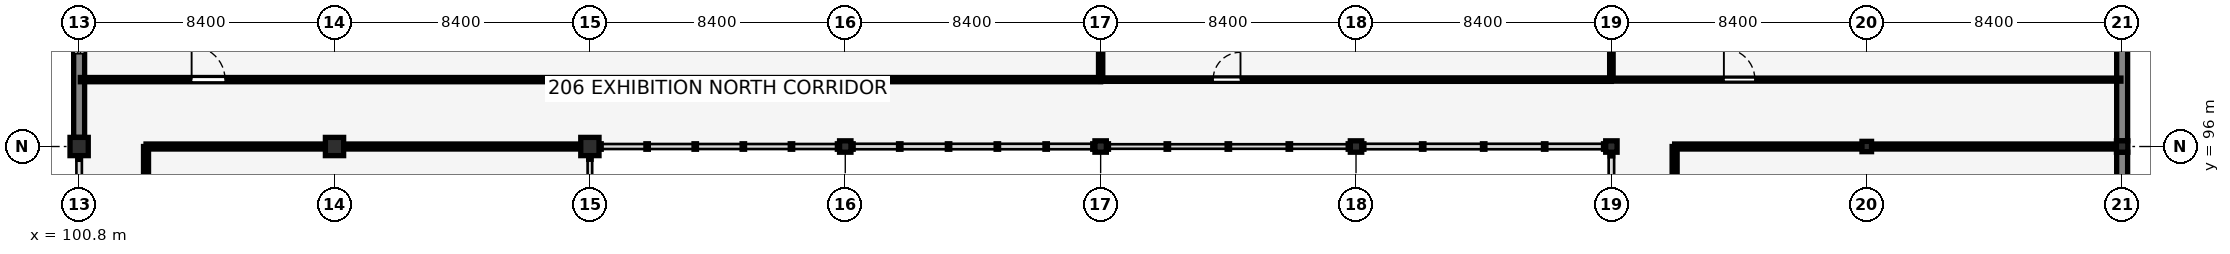
"""IFC4 building model, lengths in metres.
Left out: names, types, materials, properties, quantities, classifications, styles, units other than length and angle.
Written with IfcOpenShell. Run it as: python <this file> out.ifc"""

import sys

from ifc_helpers import new_model, si_unit, direction, frame, frame_2d, origin, origin_2d, place, context, subcontext, project, spatial, rectangle, i_section, extrude, element, fill, save


model = new_model("IFC4")
c1 = context("Model", 3, precision=1e-05, world=origin(), true_north=direction((0.0, 1.0)))
c2 = subcontext(c1, "Body", "Model", "MODEL_VIEW")
j1 = project(units=[si_unit("LENGTHUNIT", "METRE"), si_unit("PLANEANGLEUNIT", "RADIAN")], contexts=[c1])
p1 = place(None, origin())
s1 = spatial("IfcSite", under=j1, at=p1, CompositionType="ELEMENT")
p2 = place(p1, origin())
s2 = spatial("IfcBuilding", under=s1, at=p2, CompositionType="ELEMENT")
p3 = place(p2, frame((0.0, 0.0, 9.52)))
s3 = spatial("IfcBuildingStorey", under=s2, at=p3, CompositionType="ELEMENT", Elevation=9.52)
for number, where, z_axis, x_axis in (
    (1, (100.8, 96.0, 0.0), (0.0, 0.0, 1.0), (1.0, 0.0, 0.0)),
    (2, (109.2, 96.0, 0.0), (0.0, 0.0, 1.0), (1.0, 0.0, 0.0)),
    (3, (117.6, 96.0, 0.0), (0.0, 0.0, 1.0), (1.0, 0.0, 0.0)),
):
    element("IfcColumn", number, at=place(p3, frame(where, z_axis=z_axis, x_axis=x_axis)), inside=s3, PredefinedType="COLUMN", context=c2, shape_type="SweptSolid", body=[
        extrude(rectangle(XDim=0.6, YDim=0.6, at=origin_2d()), origin(), (0.0, 0.0, 1.0), 3.57),
    ])
for number, where, z_axis, x_axis in (
    (4, (126.0, 96.0, 0.0), (0.0, 0.0, 1.0), (1.0, 0.0, 0.0)),
    (5, (134.4, 96.0, 0.0), (0.0, 0.0, 1.0), (1.0, 0.0, 0.0)),
    (6, (142.8, 96.0, 0.0), (0.0, 0.0, 1.0), (1.0, 0.0, 0.0)),
    (7, (151.2, 96.0, 0.0), (0.0, 0.0, 1.0), (1.0, 0.0, 0.0)),
):
    element("IfcColumn", number, at=place(p3, frame(where, z_axis=z_axis, x_axis=x_axis)), inside=s3, PredefinedType="COLUMN", context=c2, shape_type="SweptSolid", body=[
        extrude(i_section(OverallWidth=0.375, OverallDepth=0.375, WebThickness=0.017, FlangeThickness=0.027, FilletRadius=0.015, at=origin_2d()), origin(), (0.0, 0.0, 1.0), 3.57),
    ])
p4 = place(p3, frame((159.6, 96.0, 0.0), z_axis=(0.0, 0.0, 1.0), x_axis=(1.0, 0.0, 0.0)))
e8 = element("IfcColumn", 8, at=p4, inside=s3, PredefinedType="COLUMN", context=c2, shape_type="SweptSolid", body=[
    extrude(i_section(OverallWidth=0.314, OverallDepth=0.34, WebThickness=0.019, FlangeThickness=0.031, FilletRadius=0.015, at=origin_2d()), origin(), (0.0, 0.0, 1.0), 3.57),
])
p5 = place(p3, frame((168.0, 96.0, 0.0), z_axis=(0.0, 0.0, 1.0), x_axis=(1.0, 0.0, 0.0)))
e9 = element("IfcColumn", 9, at=p5, inside=s3, PredefinedType="COLUMN", context=c2, shape_type="SweptSolid", body=[
    extrude(i_section(OverallWidth=0.375, OverallDepth=0.375, WebThickness=0.017, FlangeThickness=0.027, FilletRadius=0.015, at=origin_2d()), origin(), (0.0, 0.0, 1.0), 3.57),
])
p6 = place(p3, frame((100.8, 96.3, 0.0), z_axis=(0.0, 0.0, 1.0), x_axis=(0.0, 1.0, 0.0)))
e10 = element("IfcWall", 10, at=p6, inside=s3, PredefinedType="SOLIDWALL", context=c2, shape_type="SweptSolid", body=[
    extrude(rectangle(XDim=7.513, YDim=0.36, at=frame_2d((3.756, 0.0))), origin(), (0.0, 0.0, 1.0), 3.219),
])
p7 = place(p6, frame((2.756, 0.0, 0.9), z_axis=(0.0, 0.0, 1.0), x_axis=(1.0, 0.0, 0.0)))
e11 = element("IfcOpeningElement", 11, at=p7, cuts=e10, PredefinedType="OPENING", context=c2, shape_type="SweptSolid", body=[
    extrude(rectangle(XDim=2.0, YDim=1.5, at=frame_2d((1.0, 0.75))), frame((0.0, 0.19, 0.0), z_axis=(0.0, -1.0, 0.0), x_axis=(1.0, 0.0, 0.0)), (0.0, 0.0, 1.0), 0.38),
])
p8 = place(p3, frame((168.0, 96.187, 0.0), z_axis=(0.0, 0.0, 1.0), x_axis=(0.0, 1.0, 0.0)))
e12 = element("IfcWall", 12, at=p8, inside=s3, PredefinedType="SOLIDWALL", context=c2, shape_type="SweptSolid", body=[
    extrude(rectangle(XDim=7.625, YDim=0.36, at=frame_2d((3.813, 0.0))), origin(), (0.0, 0.0, 1.0), 3.219),
])
p9 = place(p8, frame((3.338, 0.0, 0.65), z_axis=(0.0, 0.0, 1.0), x_axis=(1.0, 0.0, 0.0)))
e13 = element("IfcOpeningElement", 13, at=p9, cuts=e12, PredefinedType="OPENING", context=c2, shape_type="SweptSolid", body=[
    extrude(rectangle(XDim=0.95, YDim=2.1, at=frame_2d((0.475, 1.05))), frame((0.0, 0.19, 0.0), z_axis=(0.0, -1.0, 0.0), x_axis=(1.0, 0.0, 0.0)), (0.0, 0.0, 1.0), 0.38),
])
p10 = place(p3, frame((168.0, 88.187, 0.0), z_axis=(0.0, 0.0, 1.0), x_axis=(0.0, 1.0, 0.0)))
e14 = element("IfcWall", 14, at=p10, inside=s3, PredefinedType="SOLIDWALL", context=c2, shape_type="SweptSolid", body=[
    extrude(rectangle(XDim=7.625, YDim=0.36, at=frame_2d((3.813, 0.0))), origin(), (0.0, 0.0, 1.0), 3.219),
])
p11 = place(p10, frame((2.113, 0.0, 0.9), z_axis=(0.0, 0.0, 1.0), x_axis=(1.0, 0.0, 0.0)))
e15 = element("IfcOpeningElement", 15, at=p11, cuts=e14, PredefinedType="OPENING", context=c2, shape_type="SweptSolid", body=[
    extrude(rectangle(XDim=3.4, YDim=1.7, at=frame_2d((1.7, 0.85))), frame((0.0, 0.19, 0.0), z_axis=(0.0, -1.0, 0.0), x_axis=(1.0, 0.0, 0.0)), (0.0, 0.0, 1.0), 0.38),
])
p12 = place(p3, frame((100.84, 98.2, 0.0), z_axis=(0.0, 0.0, 1.0), x_axis=(1.0, 0.0, 0.0)))
e16 = element("IfcWall", 16, at=p12, inside=s3, PredefinedType="PARTITIONING", context=c2, shape_type="SweptSolid", body=[
    extrude(rectangle(XDim=33.56, YDim=0.14, at=frame_2d((16.78, 0.0))), origin(), (0.0, 0.0, 1.0), 3.57),
])
p13 = place(p12, frame((3.66, 0.0, 0.0), z_axis=(0.0, 0.0, 1.0), x_axis=(1.0, 0.0, 0.0)))
e17 = element("IfcOpeningElement", 17, at=p13, cuts=e16, PredefinedType="OPENING", context=c2, shape_type="SweptSolid", body=[
    extrude(rectangle(XDim=1.1, YDim=2.2, at=frame_2d((0.55, 1.1))), frame((0.0, 0.08, 0.0), z_axis=(0.0, -1.0, 0.0), x_axis=(1.0, 0.0, 0.0)), (0.0, 0.0, 1.0), 0.16),
])
p14 = place(p3, frame((134.4, 98.2, 0.0), z_axis=(0.0, 0.0, 1.0), x_axis=(1.0, 0.0, 0.0)))
e18 = element("IfcWall", 18, at=p14, inside=s3, PredefinedType="PARTITIONING", context=c2, shape_type="SweptSolid", body=[
    extrude(rectangle(XDim=16.8, YDim=0.115, at=frame_2d((8.4, 0.0))), origin(), (0.0, 0.0, 1.0), 3.107),
])
p15 = place(p14, frame((3.7, 0.0, 0.0), z_axis=(0.0, 0.0, 1.0), x_axis=(1.0, 0.0, 0.0)))
e19 = element("IfcOpeningElement", 19, at=p15, cuts=e18, PredefinedType="OPENING", context=c2, shape_type="SweptSolid", body=[
    extrude(rectangle(XDim=0.9, YDim=2.1, at=frame_2d((0.45, 1.05))), frame((0.0, 0.067, 0.0), z_axis=(0.0, -1.0, 0.0), x_axis=(1.0, 0.0, 0.0)), (0.0, 0.0, 1.0), 0.135),
])
p16 = place(p3, frame((151.2, 98.2, 0.0), z_axis=(0.0, 0.0, 1.0), x_axis=(1.0, 0.0, 0.0)))
e20 = element("IfcWall", 20, at=p16, inside=s3, PredefinedType="PARTITIONING", context=c2, shape_type="SweptSolid", body=[
    extrude(rectangle(XDim=16.76, YDim=0.1, at=frame_2d((8.38, 0.0))), origin(), (0.0, 0.0, 1.0), 3.107),
])
p17 = place(p16, frame((3.7, 0.0, 0.0), z_axis=(0.0, 0.0, 1.0), x_axis=(1.0, 0.0, 0.0)))
e21 = element("IfcOpeningElement", 21, at=p17, cuts=e20, PredefinedType="OPENING", context=c2, shape_type="SweptSolid", body=[
    extrude(rectangle(XDim=1.02, YDim=2.16, at=frame_2d((0.51, 1.08))), frame((0.0, 0.06, 0.0), z_axis=(0.0, -1.0, 0.0), x_axis=(1.0, 0.0, 0.0)), (0.0, 0.0, 1.0), 0.12),
])
p18 = place(p3, frame((103.0, 80.0, 0.0), z_axis=(0.0, 0.0, 1.0), x_axis=(0.0, 1.0, 0.0)))
e22 = element("IfcWall", 22, at=p18, inside=s3, PredefinedType="PARTITIONING", context=c2, shape_type="SweptSolid", body=[
    extrude(rectangle(XDim=16.0, YDim=0.165, at=frame_2d((8.0, 0.0))), origin(), (0.0, 0.0, 1.0), 3.57),
])
p19 = place(p18, frame((4.55, 0.0, 0.0), z_axis=(0.0, 0.0, 1.0), x_axis=(-1.0, 0.0, 0.0)))
e23 = element("IfcOpeningElement", 23, at=p19, cuts=e22, PredefinedType="OPENING", context=c2, shape_type="SweptSolid", body=[
    extrude(rectangle(XDim=1.05, YDim=2.15, at=frame_2d((0.525, 1.075))), frame((0.0, 0.093, 0.0), z_axis=(0.0, -1.0, 0.0), x_axis=(1.0, 0.0, 0.0)), (0.0, 0.0, 1.0), 0.185),
])
p20 = place(p3, frame((153.28, 80.0, 0.0), z_axis=(0.0, 0.0, 1.0), x_axis=(0.0, 1.0, 0.0)))
e24 = element("IfcWall", 24, at=p20, inside=s3, PredefinedType="PARTITIONING", context=c2, shape_type="SweptSolid", body=[
    extrude(rectangle(XDim=16.0, YDim=0.165, at=frame_2d((8.0, 0.0))), origin(), (0.0, 0.0, 1.0), 3.57),
])
p21 = place(p20, frame((4.55, 0.0, 0.0), z_axis=(0.0, 0.0, 1.0), x_axis=(-1.0, 0.0, 0.0)))
e25 = element("IfcOpeningElement", 25, at=p21, cuts=e24, PredefinedType="OPENING", context=c2, shape_type="SweptSolid", body=[
    extrude(rectangle(XDim=1.05, YDim=2.15, at=frame_2d((0.525, 1.075))), frame((0.0, 0.093, 0.0), z_axis=(0.0, -1.0, 0.0), x_axis=(1.0, 0.0, 0.0)), (0.0, 0.0, 1.0), 0.185),
])
p22 = place(p3, frame((134.4, 98.2, 0.0), z_axis=(0.0, 0.0, 1.0), x_axis=(0.0, 1.0, 0.0)))
e26 = element("IfcWall", 26, at=p22, inside=s3, PredefinedType="PARTITIONING", context=c2, shape_type="SweptSolid", body=[
    extrude(rectangle(XDim=5.64, YDim=0.14, at=frame_2d((2.82, 0.0))), origin(), (0.0, 0.0, 1.0), 3.107),
])
p23 = place(p3, frame((151.2, 98.2, 0.0), z_axis=(0.0, 0.0, 1.0), x_axis=(0.0, 1.0, 0.0)))
e27 = element("IfcWall", 27, at=p23, inside=s3, PredefinedType="PARTITIONING", context=c2, shape_type="SweptSolid", body=[
    extrude(rectangle(XDim=5.64, YDim=0.115, at=frame_2d((2.82, 0.0))), origin(), (0.0, 0.0, 1.0), 3.107),
])
p24 = place(p3, frame((103.0, 96.0, 0.0), z_axis=(0.0, 0.0, 1.0), x_axis=(1.0, 0.0, 0.0)))
e28 = element("IfcWall", 28, at=p24, inside=s3, PredefinedType="PARTITIONING", context=c2, shape_type="SweptSolid", body=[
    extrude(rectangle(XDim=5.91, YDim=0.165, at=frame_2d((2.955, 0.0))), origin(), (0.0, 0.0, 1.0), 3.037),
])
p25 = place(p3, frame((109.49, 96.0, 0.0), z_axis=(0.0, 0.0, 1.0), x_axis=(1.0, 0.0, 0.0)))
e29 = element("IfcWall", 29, at=p25, inside=s3, PredefinedType="PARTITIONING", context=c2, shape_type="SweptSolid", body=[
    extrude(rectangle(XDim=7.82, YDim=0.165, at=frame_2d((3.91, 0.0))), origin(), (0.0, 0.0, 1.0), 3.037),
])
p26 = place(p3, frame((153.28, 96.0, 0.0), z_axis=(0.0, 0.0, 1.0), x_axis=(1.0, 0.0, 0.0)))
e30 = element("IfcWall", 30, at=p26, inside=s3, PredefinedType="PARTITIONING", context=c2, shape_type="SweptSolid", body=[
    extrude(rectangle(XDim=6.173, YDim=0.165, at=frame_2d((3.086, 0.0))), origin(), (0.0, 0.0, 1.0), 3.037),
])
p27 = place(p3, frame((159.747, 96.0, 0.0), z_axis=(0.0, 0.0, 1.0), x_axis=(1.0, 0.0, 0.0)))
e31 = element("IfcWall", 31, at=p27, inside=s3, PredefinedType="PARTITIONING", context=c2, shape_type="SweptSolid", body=[
    extrude(rectangle(XDim=8.075, YDim=0.165, at=frame_2d((4.038, 0.0))), origin(), (0.0, 0.0, 1.0), 3.037),
])
p28 = place(p7, origin())
e32 = element("IfcWindow", 32, at=p28, inside=s3, PartitioningType="DOUBLE_PANEL_VERTICAL", PredefinedType="WINDOW", context=c2, shape_type="SweptSolid", body=[
    extrude(rectangle(XDim=2.0, YDim=1.5, at=frame_2d((1.0, 0.75))), frame((0.0, 0.03, 0.0), z_axis=(0.0, -1.0, 0.0), x_axis=(1.0, 0.0, 0.0)), (0.0, 0.0, 1.0), 0.06),
])
fill(e11, e32)
p29 = place(p13, origin())
e33 = element("IfcDoor", 33, at=p29, inside=s3, OperationType="SINGLE_SWING_LEFT", PredefinedType="DOOR", context=c2, shape_type="SweptSolid", body=[
    extrude(rectangle(XDim=1.1, YDim=2.2, at=frame_2d((0.55, 1.1))), frame((0.0, 0.025, 0.0), z_axis=(0.0, -1.0, 0.0), x_axis=(1.0, 0.0, 0.0)), (0.0, 0.0, 1.0), 0.05),
])
fill(e17, e33)
p30 = place(p15, origin())
e34 = element("IfcDoor", 34, at=p30, inside=s3, OperationType="SINGLE_SWING_RIGHT", PredefinedType="DOOR", context=c2, shape_type="SweptSolid", body=[
    extrude(rectangle(XDim=0.9, YDim=2.1, at=frame_2d((0.45, 1.05))), frame((0.0, 0.025, 0.0), z_axis=(0.0, -1.0, 0.0), x_axis=(1.0, 0.0, 0.0)), (0.0, 0.0, 1.0), 0.05),
])
fill(e19, e34)
p31 = place(p17, origin())
e35 = element("IfcDoor", 35, at=p31, inside=s3, OperationType="SINGLE_SWING_LEFT", PredefinedType="DOOR", context=c2, shape_type="SweptSolid", body=[
    extrude(rectangle(XDim=1.02, YDim=2.16, at=frame_2d((0.51, 1.08))), frame((0.0, 0.025, 0.0), z_axis=(0.0, -1.0, 0.0), x_axis=(1.0, 0.0, 0.0)), (0.0, 0.0, 1.0), 0.05),
])
fill(e21, e35)
save(model, sys.argv[1])
